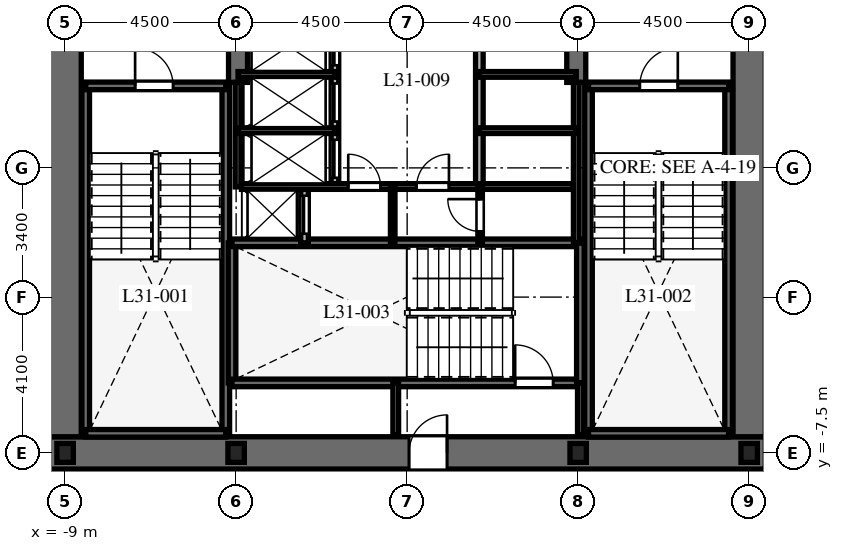
"""IFC4 building model, lengths in metres.
Left out: names, types, materials, properties, quantities, classifications, styles, units other than length and angle.
Written with IfcOpenShell. Run it as: python <this file> out.ifc"""

import sys

from ifc_helpers import new_model, si_unit, direction, frame, frame_2d, origin, origin_2d, place, context, subcontext, project, spatial, rectangle, i_section, extrude, element, fill, save


model = new_model("IFC4")
c1 = context("Model", 3, precision=1e-05, world=origin(), true_north=direction((0.0, 1.0)))
c2 = subcontext(c1, "Body", "Model", "MODEL_VIEW")
j1 = project(units=[si_unit("LENGTHUNIT", "METRE"), si_unit("PLANEANGLEUNIT", "RADIAN")], contexts=[c1])
p1 = place(None, origin())
s1 = spatial("IfcSite", under=j1, at=p1, CompositionType="ELEMENT")
p2 = place(p1, origin())
s2 = spatial("IfcBuilding", under=s1, at=p2, CompositionType="ELEMENT")
p3 = place(p2, frame((0.0, 0.0, 128.4)))
s3 = spatial("IfcBuildingStorey", under=s2, at=p3, CompositionType="ELEMENT", Elevation=128.4)
p4 = place(p3, frame((-9.425, -7.5, 0.0), z_axis=(0.0, 0.0, 1.0), x_axis=(1.0, 0.0, 0.0)))
e1 = element("IfcWall", 1, at=p4, inside=s3, PredefinedType="SHEAR", context=c2, shape_type="SweptSolid", body=[
    extrude(rectangle(XDim=18.85, YDim=0.85, at=frame_2d((9.425, 0.0))), origin(), (0.0, 0.0, 1.0), 3.7),
])
p5 = place(p4, frame((9.475, 0.0, 0.0)))
e2 = element("IfcOpeningElement", 2, at=p5, cuts=e1, PredefinedType="OPENING", context=c2, shape_type="SweptSolid", body=[
    extrude(rectangle(XDim=1.0, YDim=2.15, at=frame_2d((0.5, 1.075))), frame((0.0, 0.435, 0.0), z_axis=(0.0, -1.0, 0.0), x_axis=(1.0, 0.0, 0.0)), (0.0, 0.0, 1.0), 0.87),
])
p6 = place(p3, frame((-9.0, -7.075, 0.0), z_axis=(0.0, 0.0, 1.0), x_axis=(0.0, 1.0, 0.0)))
e3 = element("IfcWall", 3, at=p6, inside=s3, PredefinedType="SHEAR", context=c2, shape_type="SweptSolid", body=[
    extrude(rectangle(XDim=14.15, YDim=0.85, at=frame_2d((7.075, 0.0))), origin(), (0.0, 0.0, 1.0), 3.7),
])
p7 = place(p6, frame((10.2, 0.0, 0.0)))
e4 = element("IfcOpeningElement", 4, at=p7, cuts=e3, PredefinedType="OPENING", context=c2, shape_type="SweptSolid", body=[
    extrude(rectangle(XDim=1.05, YDim=2.15, at=frame_2d((0.525, 1.075))), frame((0.0, 0.435, 0.0), z_axis=(0.0, -1.0, 0.0), x_axis=(1.0, 0.0, 0.0)), (0.0, 0.0, 1.0), 0.87),
])
p8 = place(p3, frame((9.0, -7.075, 0.0), z_axis=(0.0, 0.0, 1.0), x_axis=(0.0, 1.0, 0.0)))
e5 = element("IfcWall", 5, at=p8, inside=s3, PredefinedType="SHEAR", context=c2, shape_type="SweptSolid", body=[
    extrude(rectangle(XDim=14.15, YDim=0.85, at=frame_2d((7.075, 0.0))), origin(), (0.0, 0.0, 1.0), 3.7),
])
p9 = place(p8, frame((10.2, 0.0, 0.0)))
e6 = element("IfcOpeningElement", 6, at=p9, cuts=e5, PredefinedType="OPENING", context=c2, shape_type="SweptSolid", body=[
    extrude(rectangle(XDim=1.05, YDim=2.15, at=frame_2d((0.525, 1.075))), frame((0.0, 0.435, 0.0), z_axis=(0.0, -1.0, 0.0), x_axis=(1.0, 0.0, 0.0)), (0.0, 0.0, 1.0), 0.87),
])
for number, where, z_axis, x_axis in (
    (7, (-4.45, 2.25, 0.0), (0.0, 0.0, 1.0), (0.0, 1.0, 0.0)),
    (8, (4.45, 2.25, 0.0), (0.0, 0.0, 1.0), (0.0, 1.0, 0.0)),
):
    element("IfcWall", number, at=place(p3, frame(where, z_axis=z_axis, x_axis=x_axis)), inside=s3, PredefinedType="SHEAR", context=c2, shape_type="SweptSolid", body=[
        extrude(rectangle(XDim=4.825, YDim=0.5, at=frame_2d((2.413, 0.0))), origin(), (0.0, 0.0, 1.0), 3.7),
    ])
for number, where, z_axis, x_axis in (
    (9, (-8.458, -6.985, 0.0), (0.0, 0.0, 1.0), (0.0, 1.0, 0.0)),
    (10, (-4.772, -6.985, 0.0), (0.0, 0.0, 1.0), (0.0, 1.0, 0.0)),
):
    element("IfcWall", number, at=place(p3, frame(where, z_axis=z_axis, x_axis=x_axis)), inside=s3, PredefinedType="SHEAR", context=c2, shape_type="SweptSolid", body=[
        extrude(rectangle(XDim=9.143, YDim=0.2, at=frame_2d((4.572, 0.0))), origin(), (0.0, 0.0, 1.0), 3.7),
    ])
p10 = place(p3, frame((-8.458, -6.985, 0.0), z_axis=(0.0, 0.0, 1.0), x_axis=(1.0, 0.0, 0.0)))
e11 = element("IfcWall", 11, at=p10, inside=s3, PredefinedType="SHEAR", context=c2, shape_type="SweptSolid", body=[
    extrude(rectangle(XDim=3.686, YDim=0.2, at=frame_2d((1.843, 0.0))), origin(), (0.0, 0.0, 1.0), 3.7),
])
p11 = place(p3, frame((-8.458, 2.158, 0.0), z_axis=(0.0, 0.0, 1.0), x_axis=(1.0, 0.0, 0.0)))
e12 = element("IfcWall", 12, at=p11, inside=s3, PredefinedType="SHEAR", context=c2, shape_type="SweptSolid", body=[
    extrude(rectangle(XDim=3.686, YDim=0.2, at=frame_2d((1.843, 0.0))), origin(), (0.0, 0.0, 1.0), 3.7),
])
p12 = place(p11, frame((1.3, 0.0, 0.0)))
e13 = element("IfcOpeningElement", 13, at=p12, cuts=e12, PredefinedType="OPENING", context=c2, shape_type="SweptSolid", body=[
    extrude(rectangle(XDim=1.0, YDim=2.15, at=frame_2d((0.5, 1.075))), frame((0.0, 0.11, 0.0), z_axis=(0.0, -1.0, 0.0), x_axis=(1.0, 0.0, 0.0)), (0.0, 0.0, 1.0), 0.22),
])
for number, where, z_axis, x_axis in (
    (14, (4.772, -6.985, 0.0), (0.0, 0.0, 1.0), (0.0, 1.0, 0.0)),
    (15, (8.458, -6.985, 0.0), (0.0, 0.0, 1.0), (0.0, 1.0, 0.0)),
):
    element("IfcWall", number, at=place(p3, frame(where, z_axis=z_axis, x_axis=x_axis)), inside=s3, PredefinedType="SHEAR", context=c2, shape_type="SweptSolid", body=[
        extrude(rectangle(XDim=9.143, YDim=0.2, at=frame_2d((4.572, 0.0))), origin(), (0.0, 0.0, 1.0), 3.7),
    ])
p13 = place(p3, frame((4.772, -6.985, 0.0), z_axis=(0.0, 0.0, 1.0), x_axis=(1.0, 0.0, 0.0)))
e16 = element("IfcWall", 16, at=p13, inside=s3, PredefinedType="SHEAR", context=c2, shape_type="SweptSolid", body=[
    extrude(rectangle(XDim=3.686, YDim=0.2, at=frame_2d((1.843, 0.0))), origin(), (0.0, 0.0, 1.0), 3.7),
])
p14 = place(p3, frame((4.772, 2.158, 0.0), z_axis=(0.0, 0.0, 1.0), x_axis=(1.0, 0.0, 0.0)))
e17 = element("IfcWall", 17, at=p14, inside=s3, PredefinedType="SHEAR", context=c2, shape_type="SweptSolid", body=[
    extrude(rectangle(XDim=3.686, YDim=0.2, at=frame_2d((1.843, 0.0))), origin(), (0.0, 0.0, 1.0), 3.7),
])
p15 = place(p14, frame((1.35, 0.0, 0.0)))
e18 = element("IfcOpeningElement", 18, at=p15, cuts=e17, PredefinedType="OPENING", context=c2, shape_type="SweptSolid", body=[
    extrude(rectangle(XDim=1.0, YDim=2.15, at=frame_2d((0.5, 1.075))), frame((0.0, 0.11, 0.0), z_axis=(0.0, -1.0, 0.0), x_axis=(1.0, 0.0, 0.0)), (0.0, 0.0, 1.0), 0.22),
])
p16 = place(p3, frame((-4.608, -5.658, 0.0), z_axis=(0.0, 0.0, 1.0), x_axis=(0.0, 1.0, 0.0)))
e19 = element("IfcWall", 19, at=p16, inside=s3, PredefinedType="SHEAR", context=c2, shape_type="SweptSolid", body=[
    extrude(rectangle(XDim=3.686, YDim=0.2, at=frame_2d((1.843, 0.0))), origin(), (0.0, 0.0, 1.0), 3.7),
])
p17 = place(p3, frame((-4.608, -5.658, 0.0), z_axis=(0.0, 0.0, 1.0), x_axis=(1.0, 0.0, 0.0)))
e20 = element("IfcWall", 20, at=p17, inside=s3, PredefinedType="SHEAR", context=c2, shape_type="SweptSolid", body=[
    extrude(rectangle(XDim=9.166, YDim=0.2, at=frame_2d((4.583, 0.0))), origin(), (0.0, 0.0, 1.0), 3.7),
])
p18 = place(p17, frame((7.45, 0.0, 0.0)))
e21 = element("IfcOpeningElement", 21, at=p18, cuts=e20, PredefinedType="OPENING", context=c2, shape_type="SweptSolid", body=[
    extrude(rectangle(XDim=1.0, YDim=2.15, at=frame_2d((0.5, 1.075))), frame((0.0, 0.11, 0.0), z_axis=(0.0, -1.0, 0.0), x_axis=(1.0, 0.0, 0.0)), (0.0, 0.0, 1.0), 0.22),
])
p19 = place(p3, frame((-4.608, -1.972, 0.0), z_axis=(0.0, 0.0, 1.0), x_axis=(1.0, 0.0, 0.0)))
e22 = element("IfcWall", 22, at=p19, inside=s3, PredefinedType="SHEAR", context=c2, shape_type="SweptSolid", body=[
    extrude(rectangle(XDim=9.166, YDim=0.2, at=frame_2d((4.583, 0.0))), origin(), (0.0, 0.0, 1.0), 3.7),
])
p20 = place(p3, frame((4.558, -5.658, 0.0), z_axis=(0.0, 0.0, 1.0), x_axis=(0.0, 1.0, 0.0)))
e23 = element("IfcWall", 23, at=p20, inside=s3, PredefinedType="SHEAR", context=c2, shape_type="SweptSolid", body=[
    extrude(rectangle(XDim=3.686, YDim=0.2, at=frame_2d((1.843, 0.0))), origin(), (0.0, 0.0, 1.0), 3.7),
])
for number, where, z_axis, x_axis in (
    (24, (-9.0, -7.5, 0.0), (0.0, 0.0, 1.0), (1.0, 0.0, 0.0)),
    (25, (-4.5, -7.5, 0.0), (0.0, 0.0, 1.0), (1.0, 0.0, 0.0)),
    (26, (4.5, -7.5, 0.0), (0.0, 0.0, 1.0), (1.0, 0.0, 0.0)),
    (27, (9.0, -7.5, 0.0), (0.0, 0.0, 1.0), (1.0, 0.0, 0.0)),
):
    element("IfcColumn", number, at=place(p3, frame(where, z_axis=z_axis, x_axis=x_axis)), inside=s3, PredefinedType="COLUMN", context=c2, shape_type="SweptSolid", body=[
        extrude(i_section(OverallWidth=0.432, OverallDepth=0.498, WebThickness=0.056, FlangeThickness=0.089, at=origin_2d()), origin(), (0.0, 0.0, 1.0), 3.7),
    ])
for number, where, z_axis, x_axis in (
    (28, (-0.3, -7.02, 0.0), (0.0, 0.0, 1.0), (0.0, 1.0, 0.0)),
    (29, (4.558, -7.02, 0.0), (0.0, 0.0, 1.0), (0.0, 1.0, 0.0)),
):
    element("IfcWall", number, at=place(p3, frame(where, z_axis=z_axis, x_axis=x_axis)), inside=s3, PredefinedType="PARTITIONING", context=c2, shape_type="SweptSolid", body=[
        extrude(rectangle(XDim=1.362, YDim=0.15, at=frame_2d((0.681, 0.0))), origin(), (0.0, 0.0, 1.0), 3.4),
    ])
p21 = place(p3, frame((-2.7, -1.972, 0.0), z_axis=(0.0, 0.0, 1.0), x_axis=(0.0, 1.0, 0.0)))
e30 = element("IfcWall", 30, at=p21, inside=s3, PredefinedType="PARTITIONING", context=c2, shape_type="SweptSolid", body=[
    extrude(rectangle(XDim=1.472, YDim=0.2, at=frame_2d((0.736, 0.0))), origin(), (0.0, 0.0, 1.0), 3.4),
])
p22 = place(p21, frame((0.24, 0.0, 0.0)))
e31 = element("IfcOpeningElement", 31, at=p22, cuts=e30, PredefinedType="OPENING", context=c2, shape_type="SweptSolid", body=[
    extrude(rectangle(XDim=1.0, YDim=2.2, at=frame_2d((0.5, 1.1))), frame((0.0, 0.11, 0.0), z_axis=(0.0, -1.0, 0.0), x_axis=(1.0, 0.0, 0.0)), (0.0, 0.0, 1.0), 0.22),
])
p23 = place(p3, frame((-4.45, -0.5, 0.0), z_axis=(0.0, 0.0, 1.0), x_axis=(0.0, 1.0, 0.0)))
e32 = element("IfcWall", 32, at=p23, inside=s3, PredefinedType="PARTITIONING", context=c2, shape_type="SweptSolid", body=[
    extrude(rectangle(XDim=2.75, YDim=0.15, at=frame_2d((1.375, 0.0))), origin(), (0.0, 0.0, 1.0), 3.4),
])
p24 = place(p3, frame((4.45, -1.972, 0.0), z_axis=(0.0, 0.0, 1.0), x_axis=(0.0, 1.0, 0.0)))
e33 = element("IfcWall", 33, at=p24, inside=s3, PredefinedType="PARTITIONING", context=c2, shape_type="SweptSolid", body=[
    extrude(rectangle(XDim=4.222, YDim=0.15, at=frame_2d((2.111, 0.0))), origin(), (0.0, 0.0, 1.0), 3.4),
])
p25 = place(p3, frame((-1.9, -0.5, 0.0), z_axis=(0.0, 0.0, 1.0), x_axis=(0.0, 1.0, 0.0)))
e34 = element("IfcWall", 34, at=p25, inside=s3, PredefinedType="PARTITIONING", context=c2, shape_type="SweptSolid", body=[
    extrude(rectangle(XDim=4.44, YDim=0.2, at=frame_2d((2.22, 0.0))), origin(), (0.0, 0.0, 1.0), 3.4),
])
p26 = place(p25, frame((0.24, 0.0, 0.0)))
e35 = element("IfcOpeningElement", 35, at=p26, cuts=e34, PredefinedType="OPENING", context=c2, shape_type="SweptSolid", body=[
    extrude(rectangle(XDim=1.0, YDim=2.2, at=frame_2d((0.5, 1.1))), frame((0.0, 0.11, 0.0), z_axis=(0.0, -1.0, 0.0), x_axis=(1.0, 0.0, 0.0)), (0.0, 0.0, 1.0), 0.22),
])
p27 = place(p25, frame((1.72, 0.0, 0.0)))
e36 = element("IfcOpeningElement", 36, at=p27, cuts=e34, PredefinedType="OPENING", context=c2, shape_type="SweptSolid", body=[
    extrude(rectangle(XDim=1.0, YDim=2.2, at=frame_2d((0.5, 1.1))), frame((0.0, 0.11, 0.0), z_axis=(0.0, -1.0, 0.0), x_axis=(1.0, 0.0, 0.0)), (0.0, 0.0, 1.0), 0.22),
])
p28 = place(p25, frame((3.2, 0.0, 0.0)))
e37 = element("IfcOpeningElement", 37, at=p28, cuts=e34, PredefinedType="OPENING", context=c2, shape_type="SweptSolid", body=[
    extrude(rectangle(XDim=1.0, YDim=2.2, at=frame_2d((0.5, 1.1))), frame((0.0, 0.11, 0.0), z_axis=(0.0, -1.0, 0.0), x_axis=(1.0, 0.0, 0.0)), (0.0, 0.0, 1.0), 0.22),
])
for number, where, z_axis, x_axis in (
    (38, (-4.45, 0.98, 0.0), (0.0, 0.0, 1.0), (1.0, 0.0, 0.0)),
    (39, (-4.45, 2.46, 0.0), (0.0, 0.0, 1.0), (1.0, 0.0, 0.0)),
):
    element("IfcWall", number, at=place(p3, frame(where, z_axis=z_axis, x_axis=x_axis)), inside=s3, PredefinedType="PARTITIONING", context=c2, shape_type="SweptSolid", body=[
        extrude(rectangle(XDim=2.55, YDim=0.15, at=frame_2d((1.275, 0.0))), origin(), (0.0, 0.0, 1.0), 3.4),
    ])
p29 = place(p3, frame((1.9, -0.5, 0.0), z_axis=(0.0, 0.0, 1.0), x_axis=(0.0, 1.0, 0.0)))
e40 = element("IfcWall", 40, at=p29, inside=s3, PredefinedType="PARTITIONING", context=c2, shape_type="SweptSolid", body=[
    extrude(rectangle(XDim=4.44, YDim=0.2, at=frame_2d((2.22, 0.0))), origin(), (0.0, 0.0, 1.0), 3.4),
])
for number, where, z_axis, x_axis in (
    (41, (1.9, 0.98, 0.0), (0.0, 0.0, 1.0), (1.0, 0.0, 0.0)),
    (42, (1.9, 2.46, 0.0), (0.0, 0.0, 1.0), (1.0, 0.0, 0.0)),
):
    element("IfcWall", number, at=place(p3, frame(where, z_axis=z_axis, x_axis=x_axis)), inside=s3, PredefinedType="PARTITIONING", context=c2, shape_type="SweptSolid", body=[
        extrude(rectangle(XDim=2.55, YDim=0.15, at=frame_2d((1.275, 0.0))), origin(), (0.0, 0.0, 1.0), 3.4),
    ])
p30 = place(p3, frame((-4.36, -0.49, 0.0), z_axis=(0.0, 0.0, 1.0), x_axis=(1.0, 0.0, 0.0)))
e43 = element("IfcWall", 43, at=p30, inside=s3, PredefinedType="PARTITIONING", context=c2, shape_type="SweptSolid", body=[
    extrude(rectangle(XDim=8.72, YDim=0.15, at=frame_2d((4.36, 0.0))), origin(), (0.0, 0.0, 1.0), 3.4),
])
p31 = place(p30, frame((2.81, 0.0, 0.0)))
e44 = element("IfcOpeningElement", 44, at=p31, cuts=e43, PredefinedType="OPENING", context=c2, shape_type="SweptSolid", body=[
    extrude(rectangle(XDim=0.85, YDim=2.03, at=frame_2d((0.425, 1.015))), frame((0.0, 0.085, 0.0), z_axis=(0.0, -1.0, 0.0), x_axis=(1.0, 0.0, 0.0)), (0.0, 0.0, 1.0), 0.17),
])
p32 = place(p30, frame((4.61, 0.0, 0.0)))
e45 = element("IfcOpeningElement", 45, at=p32, cuts=e43, PredefinedType="OPENING", context=c2, shape_type="SweptSolid", body=[
    extrude(rectangle(XDim=0.85, YDim=2.03, at=frame_2d((0.425, 1.015))), frame((0.0, 0.085, 0.0), z_axis=(0.0, -1.0, 0.0), x_axis=(1.0, 0.0, 0.0)), (0.0, 0.0, 1.0), 0.17),
])
p33 = place(p3, frame((-0.38, -1.972, 0.0), z_axis=(0.0, 0.0, 1.0), x_axis=(0.0, 1.0, 0.0)))
e46 = element("IfcWall", 46, at=p33, inside=s3, PredefinedType="PARTITIONING", context=c2, shape_type="SweptSolid", body=[
    extrude(rectangle(XDim=1.472, YDim=0.12, at=frame_2d((0.736, 0.0))), origin(), (0.0, 0.0, 1.0), 3.4),
])
p34 = place(p3, frame((1.92, -1.972, 0.0), z_axis=(0.0, 0.0, 1.0), x_axis=(0.0, 1.0, 0.0)))
e47 = element("IfcWall", 47, at=p34, inside=s3, PredefinedType="PARTITIONING", context=c2, shape_type="SweptSolid", body=[
    extrude(rectangle(XDim=1.472, YDim=0.12, at=frame_2d((0.736, 0.0))), origin(), (0.0, 0.0, 1.0), 3.4),
])
p35 = place(p34, frame((0.3, 0.0, 0.0)))
e48 = element("IfcOpeningElement", 48, at=p35, cuts=e47, PredefinedType="OPENING", context=c2, shape_type="SweptSolid", body=[
    extrude(rectangle(XDim=0.85, YDim=2.03, at=frame_2d((0.425, 1.015))), frame((0.0, 0.07, 0.0), z_axis=(0.0, -1.0, 0.0), x_axis=(1.0, 0.0, 0.0)), (0.0, 0.0, 1.0), 0.14),
])
p36 = place(p12, origin())
e49 = element("IfcDoor", 49, at=p36, inside=s3, OperationType="SINGLE_SWING_LEFT", PredefinedType="DOOR", context=c2, shape_type="SweptSolid", body=[
    extrude(rectangle(XDim=1.0, YDim=2.15, at=frame_2d((0.5, 1.075))), frame((0.0, 0.025, 0.0), z_axis=(0.0, -1.0, 0.0), x_axis=(1.0, 0.0, 0.0)), (0.0, 0.0, 1.0), 0.05),
])
fill(e13, e49)
p37 = place(p15, origin())
e50 = element("IfcDoor", 50, at=p37, inside=s3, OperationType="SINGLE_SWING_RIGHT", PredefinedType="DOOR", context=c2, shape_type="SweptSolid", body=[
    extrude(rectangle(XDim=1.0, YDim=2.15, at=frame_2d((0.5, 1.075))), frame((0.0, 0.025, 0.0), z_axis=(0.0, -1.0, 0.0), x_axis=(1.0, 0.0, 0.0)), (0.0, 0.0, 1.0), 0.05),
])
fill(e18, e50)
p38 = place(p18, origin())
e51 = element("IfcDoor", 51, at=p38, inside=s3, OperationType="SINGLE_SWING_LEFT", PredefinedType="DOOR", context=c2, shape_type="SweptSolid", body=[
    extrude(rectangle(XDim=1.0, YDim=2.15, at=frame_2d((0.5, 1.075))), frame((0.0, 0.025, 0.0), z_axis=(0.0, -1.0, 0.0), x_axis=(1.0, 0.0, 0.0)), (0.0, 0.0, 1.0), 0.05),
])
fill(e21, e51)
p39 = place(p5, origin())
e52 = element("IfcDoor", 52, at=p39, inside=s3, OperationType="SINGLE_SWING_RIGHT", PredefinedType="DOOR", context=c2, shape_type="SweptSolid", body=[
    extrude(rectangle(XDim=1.0, YDim=2.15, at=frame_2d((0.5, 1.075))), frame((0.0, 0.025, 0.0), z_axis=(0.0, -1.0, 0.0), x_axis=(1.0, 0.0, 0.0)), (0.0, 0.0, 1.0), 0.05),
])
fill(e2, e52)
p40 = place(p22, origin())
e53 = element("IfcDoor", 53, at=p40, inside=s3, OperationType="SLIDING_TO_LEFT", PredefinedType="DOOR", context=c2, shape_type="SweptSolid", body=[
    extrude(rectangle(XDim=1.0, YDim=2.2, at=frame_2d((0.5, 1.1))), frame((0.0, 0.025, 0.0), z_axis=(0.0, -1.0, 0.0), x_axis=(1.0, 0.0, 0.0)), (0.0, 0.0, 1.0), 0.05),
])
fill(e31, e53)
p41 = place(p26, origin())
e54 = element("IfcDoor", 54, at=p41, inside=s3, OperationType="SLIDING_TO_LEFT", PredefinedType="DOOR", context=c2, shape_type="SweptSolid", body=[
    extrude(rectangle(XDim=1.0, YDim=2.2, at=frame_2d((0.5, 1.1))), frame((0.0, 0.025, 0.0), z_axis=(0.0, -1.0, 0.0), x_axis=(1.0, 0.0, 0.0)), (0.0, 0.0, 1.0), 0.05),
])
fill(e35, e54)
p42 = place(p27, origin())
e55 = element("IfcDoor", 55, at=p42, inside=s3, OperationType="SLIDING_TO_LEFT", PredefinedType="DOOR", context=c2, shape_type="SweptSolid", body=[
    extrude(rectangle(XDim=1.0, YDim=2.2, at=frame_2d((0.5, 1.1))), frame((0.0, 0.025, 0.0), z_axis=(0.0, -1.0, 0.0), x_axis=(1.0, 0.0, 0.0)), (0.0, 0.0, 1.0), 0.05),
])
fill(e36, e55)
p43 = place(p28, origin())
e56 = element("IfcDoor", 56, at=p43, inside=s3, OperationType="SLIDING_TO_LEFT", PredefinedType="DOOR", context=c2, shape_type="SweptSolid", body=[
    extrude(rectangle(XDim=1.0, YDim=2.2, at=frame_2d((0.5, 1.1))), frame((0.0, 0.025, 0.0), z_axis=(0.0, -1.0, 0.0), x_axis=(1.0, 0.0, 0.0)), (0.0, 0.0, 1.0), 0.05),
])
fill(e37, e56)
p44 = place(p31, origin())
e57 = element("IfcDoor", 57, at=p44, inside=s3, OperationType="SINGLE_SWING_LEFT", PredefinedType="DOOR", context=c2, shape_type="SweptSolid", body=[
    extrude(rectangle(XDim=0.85, YDim=2.03, at=frame_2d((0.425, 1.015))), frame((0.0, 0.025, 0.0), z_axis=(0.0, -1.0, 0.0), x_axis=(1.0, 0.0, 0.0)), (0.0, 0.0, 1.0), 0.05),
])
fill(e44, e57)
p45 = place(p32, origin())
e58 = element("IfcDoor", 58, at=p45, inside=s3, OperationType="SINGLE_SWING_RIGHT", PredefinedType="DOOR", context=c2, shape_type="SweptSolid", body=[
    extrude(rectangle(XDim=0.85, YDim=2.03, at=frame_2d((0.425, 1.015))), frame((0.0, 0.025, 0.0), z_axis=(0.0, -1.0, 0.0), x_axis=(1.0, 0.0, 0.0)), (0.0, 0.0, 1.0), 0.05),
])
fill(e45, e58)
p46 = place(p35, origin())
e59 = element("IfcDoor", 59, at=p46, inside=s3, OperationType="SINGLE_SWING_RIGHT", PredefinedType="DOOR", context=c2, shape_type="SweptSolid", body=[
    extrude(rectangle(XDim=0.85, YDim=2.03, at=frame_2d((0.425, 1.015))), frame((0.0, 0.025, 0.0), z_axis=(0.0, -1.0, 0.0), x_axis=(1.0, 0.0, 0.0)), (0.0, 0.0, 1.0), 0.05),
])
fill(e48, e59)
save(model, sys.argv[1])
